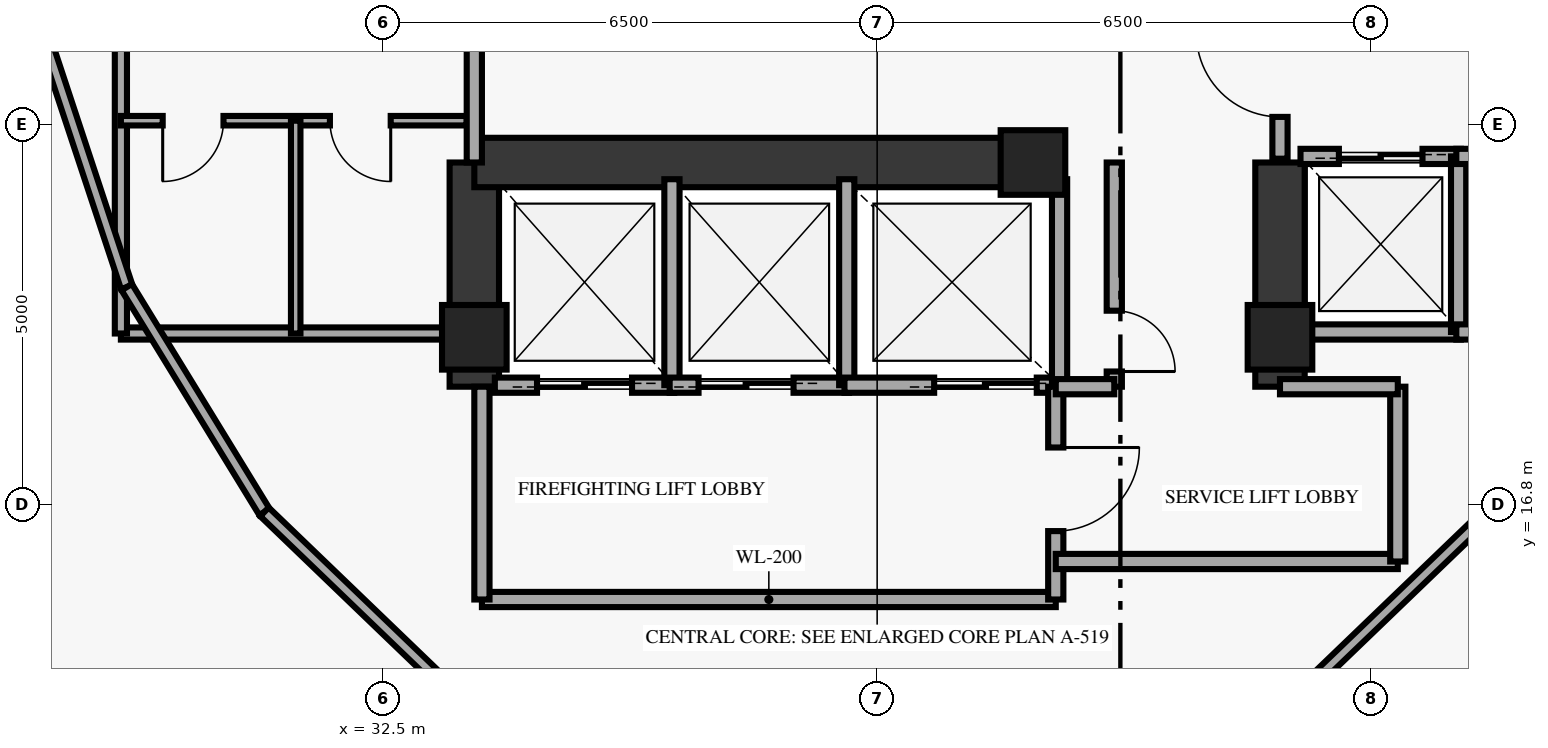
"""IFC4 building model, lengths in metres.
Left out: names, types, materials, properties, quantities, classifications, styles, units other than length and angle.
Written with IfcOpenShell. Run it as: python <this file> out.ifc"""

import sys

from ifc_helpers import new_model, si_unit, direction, frame, frame_2d, origin, origin_2d, place, context, subcontext, project, spatial, rectangle, extrude, element, fill, save


model = new_model("IFC4")
c1 = context("Model", 3, precision=1e-05, world=origin(), true_north=direction((0.0, 1.0)))
c2 = subcontext(c1, "Body", "Model", "MODEL_VIEW")
j1 = project(units=[si_unit("LENGTHUNIT", "METRE"), si_unit("PLANEANGLEUNIT", "RADIAN")], contexts=[c1])
p1 = place(None, origin())
s1 = spatial("IfcSite", under=j1, at=p1, CompositionType="ELEMENT")
p2 = place(p1, origin())
s2 = spatial("IfcBuilding", under=s1, at=p2, CompositionType="ELEMENT")
p3 = place(p2, frame((0.0, 0.0, 203.15)))
s3 = spatial("IfcBuildingStorey", under=s2, at=p3, CompositionType="ELEMENT", Elevation=203.15)
for number, where, z_axis, x_axis in (
    (1, (33.7, 19.0, 0.0), (0.0, 0.0, 1.0), (1.0, 0.0, 0.0)),
    (2, (41.05, 21.3, 0.0), (0.0, 0.0, 1.0), (1.0, 0.0, 0.0)),
    (3, (44.3, 19.0, 0.0), (0.0, 0.0, 1.0), (1.0, 0.0, 0.0)),
):
    element("IfcColumn", number, at=place(p3, frame(where, z_axis=z_axis, x_axis=x_axis)), inside=s3, PredefinedType="PILASTER", context=c2, shape_type="SweptSolid", body=[
        extrude(rectangle(XDim=0.85, YDim=0.85, at=origin_2d()), origin(), (0.0, 0.0, 1.0), 4.76),
    ])
for number, where, z_axis, x_axis in (
    (4, (33.7, 18.35, 0.0), (0.0, 0.0, 1.0), (0.0, 1.0, 0.0)),
    (5, (44.3, 18.35, 0.0), (0.0, 0.0, 1.0), (0.0, 1.0, 0.0)),
):
    element("IfcWall", number, at=place(p3, frame(where, z_axis=z_axis, x_axis=x_axis)), inside=s3, PredefinedType="SHEAR", context=c2, shape_type="SweptSolid", body=[
        extrude(rectangle(XDim=2.95, YDim=0.65, at=frame_2d((1.475, 0.0))), origin(), (0.0, 0.0, 1.0), 4.76),
    ])
p4 = place(p3, frame((33.7, 21.3, 0.0), z_axis=(0.0, 0.0, 1.0), x_axis=(1.0, 0.0, 0.0)))
e6 = element("IfcWall", 6, at=p4, inside=s3, PredefinedType="SHEAR", context=c2, shape_type="SweptSolid", body=[
    extrude(rectangle(XDim=7.55, YDim=0.65, at=frame_2d((3.775, 0.0))), origin(), (0.0, 0.0, 1.0), 4.76),
])
p5 = place(p3, frame((44.57, 19.07, 0.0), z_axis=(0.0, 0.0, 1.0), x_axis=(1.0, 0.0, 0.0)))
e7 = element("IfcWall", 7, at=p5, inside=s3, PredefinedType="SOLIDWALL", context=c2, shape_type="SweptSolid", body=[
    extrude(rectangle(XDim=2.11, YDim=0.2, at=frame_2d((1.055, 0.0))), origin(), (0.0, 0.0, 1.0), 4.76),
])
p6 = place(p3, frame((44.57, 21.38, 0.0), z_axis=(0.0, 0.0, 1.0), x_axis=(1.0, 0.0, 0.0)))
e8 = element("IfcWall", 8, at=p6, inside=s3, PredefinedType="SOLIDWALL", context=c2, shape_type="SweptSolid", body=[
    extrude(rectangle(XDim=2.11, YDim=0.2, at=frame_2d((1.055, 0.0))), origin(), (0.0, 0.0, 1.0), 4.76),
])
p7 = place(p6, frame((0.505, 0.0, 0.0)))
e9 = element("IfcOpeningElement", 9, at=p7, cuts=e8, PredefinedType="OPENING", context=c2, shape_type="SweptSolid", body=[
    extrude(rectangle(XDim=1.1, YDim=2.15, at=frame_2d((0.55, 1.075))), frame((0.0, 0.11, 0.0), z_axis=(0.0, -1.0, 0.0), x_axis=(1.0, 0.0, 0.0)), (0.0, 0.0, 1.0), 0.22),
])
for number, where, z_axis, x_axis in (
    (10, (46.65, 19.07, 0.0), (0.0, 0.0, 1.0), (0.0, 1.0, 0.0)),
    (11, (46.62, 19.07, 0.0), (0.0, 0.0, 1.0), (1.0, 0.0, 0.0)),
):
    element("IfcWall", number, at=place(p3, frame(where, z_axis=z_axis, x_axis=x_axis)), inside=s3, PredefinedType="SOLIDWALL", context=c2, shape_type="SweptSolid", body=[
        extrude(rectangle(XDim=2.31, YDim=0.2, at=frame_2d((1.155, 0.0))), origin(), (0.0, 0.0, 1.0), 4.76),
    ])
p8 = place(p3, frame((46.62, 21.38, 0.0), z_axis=(0.0, 0.0, 1.0), x_axis=(1.0, 0.0, 0.0)))
e12 = element("IfcWall", 12, at=p8, inside=s3, PredefinedType="SOLIDWALL", context=c2, shape_type="SweptSolid", body=[
    extrude(rectangle(XDim=2.31, YDim=0.2, at=frame_2d((1.155, 0.0))), origin(), (0.0, 0.0, 1.0), 4.76),
])
p9 = place(p8, frame((0.605, 0.0, 0.0)))
e13 = element("IfcOpeningElement", 13, at=p9, cuts=e12, PredefinedType="OPENING", context=c2, shape_type="SweptSolid", body=[
    extrude(rectangle(XDim=1.1, YDim=2.15, at=frame_2d((0.55, 1.075))), frame((0.0, 0.11, 0.0), z_axis=(0.0, -1.0, 0.0), x_axis=(1.0, 0.0, 0.0)), (0.0, 0.0, 1.0), 0.22),
])
p10 = place(p3, frame((33.97, 18.37, 0.0), z_axis=(0.0, 0.0, 1.0), x_axis=(1.0, 0.0, 0.0)))
e14 = element("IfcWall", 14, at=p10, inside=s3, PredefinedType="SOLIDWALL", context=c2, shape_type="SweptSolid", body=[
    extrude(rectangle(XDim=2.36, YDim=0.2, at=frame_2d((1.18, 0.0))), origin(), (0.0, 0.0, 1.0), 4.76),
])
p11 = place(p10, frame((0.555, 0.0, 0.0)))
e15 = element("IfcOpeningElement", 15, at=p11, cuts=e14, PredefinedType="OPENING", context=c2, shape_type="SweptSolid", body=[
    extrude(rectangle(XDim=1.25, YDim=2.2, at=frame_2d((0.625, 1.1))), frame((0.0, 0.11, 0.0), z_axis=(0.0, -1.0, 0.0), x_axis=(1.0, 0.0, 0.0)), (0.0, 0.0, 1.0), 0.22),
])
p12 = place(p3, frame((36.3, 18.37, 0.0), z_axis=(0.0, 0.0, 1.0), x_axis=(0.0, 1.0, 0.0)))
e16 = element("IfcWall", 16, at=p12, inside=s3, PredefinedType="SOLIDWALL", context=c2, shape_type="SweptSolid", body=[
    extrude(rectangle(XDim=2.71, YDim=0.2, at=frame_2d((1.355, 0.0))), origin(), (0.0, 0.0, 1.0), 4.76),
])
p13 = place(p3, frame((36.27, 18.37, 0.0), z_axis=(0.0, 0.0, 1.0), x_axis=(1.0, 0.0, 0.0)))
e17 = element("IfcWall", 17, at=p13, inside=s3, PredefinedType="SOLIDWALL", context=c2, shape_type="SweptSolid", body=[
    extrude(rectangle(XDim=2.36, YDim=0.2, at=frame_2d((1.18, 0.0))), origin(), (0.0, 0.0, 1.0), 4.76),
])
p14 = place(p13, frame((0.38, 0.0, 0.0)))
e18 = element("IfcOpeningElement", 18, at=p14, cuts=e17, PredefinedType="OPENING", context=c2, shape_type="SweptSolid", body=[
    extrude(rectangle(XDim=1.25, YDim=2.2, at=frame_2d((0.625, 1.1))), frame((0.0, 0.11, 0.0), z_axis=(0.0, -1.0, 0.0), x_axis=(1.0, 0.0, 0.0)), (0.0, 0.0, 1.0), 0.22),
])
p15 = place(p3, frame((38.6, 18.37, 0.0), z_axis=(0.0, 0.0, 1.0), x_axis=(0.0, 1.0, 0.0)))
e19 = element("IfcWall", 19, at=p15, inside=s3, PredefinedType="SOLIDWALL", context=c2, shape_type="SweptSolid", body=[
    extrude(rectangle(XDim=2.71, YDim=0.2, at=frame_2d((1.355, 0.0))), origin(), (0.0, 0.0, 1.0), 4.76),
])
p16 = place(p3, frame((38.57, 18.37, 0.0), z_axis=(0.0, 0.0, 1.0), x_axis=(1.0, 0.0, 0.0)))
e20 = element("IfcWall", 20, at=p16, inside=s3, PredefinedType="SOLIDWALL", context=c2, shape_type="SweptSolid", body=[
    extrude(rectangle(XDim=2.83, YDim=0.2, at=frame_2d((1.415, 0.0))), origin(), (0.0, 0.0, 1.0), 4.76),
])
p17 = place(p16, frame((1.18, 0.0, 0.0)))
e21 = element("IfcOpeningElement", 21, at=p17, cuts=e20, PredefinedType="OPENING", context=c2, shape_type="SweptSolid", body=[
    extrude(rectangle(XDim=1.35, YDim=2.18, at=frame_2d((0.675, 1.09))), frame((0.0, 0.11, 0.0), z_axis=(0.0, -1.0, 0.0), x_axis=(1.0, 0.0, 0.0)), (0.0, 0.0, 1.0), 0.22),
])
p18 = place(p3, frame((41.4, 18.37, 0.0), z_axis=(0.0, 0.0, 1.0), x_axis=(0.0, 1.0, 0.0)))
e22 = element("IfcWall", 22, at=p18, inside=s3, PredefinedType="SOLIDWALL", context=c2, shape_type="SweptSolid", body=[
    extrude(rectangle(XDim=2.71, YDim=0.2, at=frame_2d((1.355, 0.0))), origin(), (0.0, 0.0, 1.0), 4.76),
])
p19 = place(p3, frame((29.05, 19.05, 0.0), z_axis=(0.0, 0.0, 1.0), x_axis=(1.0, 0.0, 0.0)))
e23 = element("IfcWall", 23, at=p19, inside=s3, PredefinedType="PARTITIONING", context=c2, shape_type="SweptSolid", body=[
    extrude(rectangle(XDim=4.65, YDim=0.16, at=frame_2d((2.325, 0.0))), origin(), (0.0, 0.0, 1.0), 4.76),
])
p20 = place(p3, frame((29.05, 19.05, 0.0), z_axis=(0.0, 0.0, 1.0), x_axis=(0.0, 1.0, 0.0)))
e24 = element("IfcWall", 24, at=p20, inside=s3, PredefinedType="PARTITIONING", context=c2, shape_type="SweptSolid", body=[
    extrude(rectangle(XDim=7.07, YDim=0.16, at=frame_2d((3.535, 0.0))), origin(), (0.0, 0.0, 1.0), 4.76),
])
p21 = place(p3, frame((33.6, 21.85, 0.0), z_axis=(0.0, 0.0, 1.0), x_axis=(-1.0, 0.0, 0.0)))
e25 = element("IfcWall", 25, at=p21, inside=s3, PredefinedType="PARTITIONING", context=c2, shape_type="SweptSolid", body=[
    extrude(rectangle(XDim=4.55, YDim=0.125, at=frame_2d((2.275, 0.0))), origin(), (0.0, 0.0, 1.0), 4.76),
])
p22 = place(p21, frame((3.2, 0.0, 0.0)))
e26 = element("IfcOpeningElement", 26, at=p22, cuts=e25, PredefinedType="OPENING", context=c2, shape_type="SweptSolid", body=[
    extrude(rectangle(XDim=0.8, YDim=2.05, at=frame_2d((0.4, 1.025))), frame((0.0, 0.073, 0.0), z_axis=(0.0, -1.0, 0.0), x_axis=(1.0, 0.0, 0.0)), (0.0, 0.0, 1.0), 0.145),
])
p23 = place(p21, frame((1.0, 0.0, 0.0)))
e27 = element("IfcOpeningElement", 27, at=p23, cuts=e25, PredefinedType="OPENING", context=c2, shape_type="SweptSolid", body=[
    extrude(rectangle(XDim=0.8, YDim=2.05, at=frame_2d((0.4, 1.025))), frame((0.0, 0.073, 0.0), z_axis=(0.0, -1.0, 0.0), x_axis=(1.0, 0.0, 0.0)), (0.0, 0.0, 1.0), 0.145),
])
p24 = place(p3, frame((31.35, 19.05, 0.0), z_axis=(0.0, 0.0, 1.0), x_axis=(0.0, 1.0, 0.0)))
e28 = element("IfcWall", 28, at=p24, inside=s3, PredefinedType="PARTITIONING", context=c2, shape_type="SweptSolid", body=[
    extrude(rectangle(XDim=2.8, YDim=0.125, at=frame_2d((1.4, 0.0))), origin(), (0.0, 0.0, 1.0), 4.76),
])
p25 = place(p3, frame((33.7, 21.3, 0.0), z_axis=(0.0, 0.0, 1.0), x_axis=(0.0, 1.0, 0.0)))
e29 = element("IfcWall", 29, at=p25, inside=s3, PredefinedType="SOLIDWALL", context=c2, shape_type="SweptSolid", body=[
    extrude(rectangle(XDim=2.15, YDim=0.2, at=frame_2d((1.075, 0.0))), origin(), (0.0, 0.0, 1.0), 4.145),
])
p26 = place(p3, frame((44.3, 21.35, 0.0), z_axis=(0.0, 0.0, 1.0), x_axis=(0.0, 1.0, 0.0)))
e30 = element("IfcWall", 30, at=p26, inside=s3, PredefinedType="SOLIDWALL", context=c2, shape_type="SweptSolid", body=[
    extrude(rectangle(XDim=2.1, YDim=0.2, at=frame_2d((1.05, 0.0))), origin(), (0.0, 0.0, 1.0), 4.145),
])
p27 = place(p26, frame((0.55, 0.0, 0.0)))
e31 = element("IfcOpeningElement", 31, at=p27, cuts=e30, PredefinedType="OPENING", context=c2, shape_type="SweptSolid", body=[
    extrude(rectangle(XDim=1.1, YDim=2.15, at=frame_2d((0.55, 1.075))), frame((0.0, 0.11, 0.0), z_axis=(0.0, -1.0, 0.0), x_axis=(1.0, 0.0, 0.0)), (0.0, 0.0, 1.0), 0.22),
])
p28 = place(p3, frame((33.8, 15.55, 0.0), z_axis=(0.0, 0.0, 1.0), x_axis=(1.0, 0.0, 0.0)))
e32 = element("IfcWall", 32, at=p28, inside=s3, PredefinedType="SOLIDWALL", context=c2, shape_type="SweptSolid", body=[
    extrude(rectangle(XDim=7.55, YDim=0.2, at=frame_2d((3.775, 0.0))), origin(), (0.0, 0.0, 1.0), 4.76),
])
p29 = place(p3, frame((33.8, 15.55, 0.0), z_axis=(0.0, 0.0, 1.0), x_axis=(0.0, 1.0, 0.0)))
e33 = element("IfcWall", 33, at=p29, inside=s3, PredefinedType="SOLIDWALL", context=c2, shape_type="SweptSolid", body=[
    extrude(rectangle(XDim=2.8, YDim=0.2, at=frame_2d((1.4, 0.0))), origin(), (0.0, 0.0, 1.0), 4.76),
])
p30 = place(p3, frame((41.35, 15.55, 0.0), z_axis=(0.0, 0.0, 1.0), x_axis=(0.0, 1.0, 0.0)))
e34 = element("IfcWall", 34, at=p30, inside=s3, PredefinedType="SOLIDWALL", context=c2, shape_type="SweptSolid", body=[
    extrude(rectangle(XDim=2.8, YDim=0.2, at=frame_2d((1.4, 0.0))), origin(), (0.0, 0.0, 1.0), 4.76),
])
p31 = place(p30, frame((0.9, 0.0, 0.0)))
e35 = element("IfcOpeningElement", 35, at=p31, cuts=e34, PredefinedType="OPENING", context=c2, shape_type="SweptSolid", body=[
    extrude(rectangle(XDim=1.1, YDim=2.15, at=frame_2d((0.55, 1.075))), frame((0.0, 0.11, 0.0), z_axis=(0.0, -1.0, 0.0), x_axis=(1.0, 0.0, 0.0)), (0.0, 0.0, 1.0), 0.22),
])
p32 = place(p3, frame((41.35, 16.05, 0.0), z_axis=(0.0, 0.0, 1.0), x_axis=(1.0, 0.0, 0.0)))
e36 = element("IfcWall", 36, at=p32, inside=s3, PredefinedType="SOLIDWALL", context=c2, shape_type="SweptSolid", body=[
    extrude(rectangle(XDim=4.5, YDim=0.2, at=frame_2d((2.25, 0.0))), origin(), (0.0, 0.0, 1.0), 4.76),
])
p33 = place(p3, frame((45.85, 16.05, 0.0), z_axis=(0.0, 0.0, 1.0), x_axis=(0.0, 1.0, 0.0)))
e37 = element("IfcWall", 37, at=p33, inside=s3, PredefinedType="SOLIDWALL", context=c2, shape_type="SweptSolid", body=[
    extrude(rectangle(XDim=2.3, YDim=0.2, at=frame_2d((1.15, 0.0))), origin(), (0.0, 0.0, 1.0), 4.76),
])
p34 = place(p3, frame((44.3, 18.35, 0.0), z_axis=(0.0, 0.0, 1.0), x_axis=(1.0, 0.0, 0.0)))
e38 = element("IfcWall", 38, at=p34, inside=s3, PredefinedType="SOLIDWALL", context=c2, shape_type="SweptSolid", body=[
    extrude(rectangle(XDim=1.55, YDim=0.2, at=frame_2d((0.775, 0.0))), origin(), (0.0, 0.0, 1.0), 4.76),
])
p35 = place(p3, frame((42.12, 18.35, 0.0), z_axis=(0.0, 0.0, 1.0), x_axis=(0.0, 1.0, 0.0)))
e39 = element("IfcWall", 39, at=p35, inside=s3, PredefinedType="SOLIDWALL", context=c2, shape_type="SweptSolid", body=[
    extrude(rectangle(XDim=2.95, YDim=0.2, at=frame_2d((1.475, 0.0))), origin(), (0.0, 0.0, 1.0), 4.76),
])
p36 = place(p35, frame((0.2, 0.0, 0.0)))
e40 = element("IfcOpeningElement", 40, at=p36, cuts=e39, PredefinedType="OPENING", context=c2, shape_type="SweptSolid", body=[
    extrude(rectangle(XDim=0.8, YDim=2.05, at=frame_2d((0.4, 1.025))), frame((0.0, 0.11, 0.0), z_axis=(0.0, -1.0, 0.0), x_axis=(1.0, 0.0, 0.0)), (0.0, 0.0, 1.0), 0.22),
])
p37 = place(p3, frame((41.35, 18.35, 0.0), z_axis=(0.0, 0.0, 1.0), x_axis=(1.0, 0.0, 0.0)))
e41 = element("IfcWall", 41, at=p37, inside=s3, PredefinedType="SOLIDWALL", context=c2, shape_type="SweptSolid", body=[
    extrude(rectangle(XDim=0.77, YDim=0.2, at=frame_2d((0.385, 0.0))), origin(), (0.0, 0.0, 1.0), 4.76),
])
p38 = place(p3, frame((27.988, 23.104, 0.0), z_axis=(0.0, 0.0, 1.0), x_axis=(0.313965508334, -0.949434389295, 0.0)))
e42 = element("IfcWall", 42, at=p38, inside=s3, PredefinedType="PARTITIONING", context=c2, shape_type="SweptSolid", body=[
    extrude(rectangle(XDim=3.627, YDim=0.16, at=frame_2d((1.814, 0.0))), origin(), (0.0, 0.0, 1.0), 4.76),
])
p39 = place(p3, frame((29.127, 19.66, 0.0), z_axis=(0.0, 0.0, 1.0), x_axis=(0.522486120877, -0.852647789823, 0.0)))
e43 = element("IfcWall", 43, at=p39, inside=s3, PredefinedType="PARTITIONING", context=c2, shape_type="SweptSolid", body=[
    extrude(rectangle(XDim=3.468, YDim=0.16, at=frame_2d((1.734, 0.0))), origin(), (0.0, 0.0, 1.0), 4.76),
])
for number, where, z_axis, x_axis in (
    (44, (30.939, 16.703, 0.0), (0.0, 0.0, 1.0), (0.721, -0.693, 0.0)),
    (45, (44.7, 14.433, 0.0), (0.0, 0.0, 1.0), (0.721, 0.693, 0.0)),
):
    element("IfcWall", number, at=place(p3, frame(where, z_axis=z_axis, x_axis=x_axis)), inside=s3, PredefinedType="PARTITIONING", context=c2, shape_type="SweptSolid", body=[
        extrude(rectangle(XDim=3.275, YDim=0.16, at=frame_2d((1.638, 0.0))), origin(), (0.0, 0.0, 1.0), 4.76),
    ])
p40 = place(p7, origin())
e46 = element("IfcDoor", 46, at=p40, inside=s3, OperationType="DOUBLE_DOOR_SLIDING", PredefinedType="DOOR", context=c2, shape_type="SweptSolid", body=[
    extrude(rectangle(XDim=1.1, YDim=2.15, at=frame_2d((0.55, 1.075))), frame((0.0, 0.025, 0.0), z_axis=(0.0, -1.0, 0.0), x_axis=(1.0, 0.0, 0.0)), (0.0, 0.0, 1.0), 0.05),
])
fill(e9, e46)
p41 = place(p11, origin())
e47 = element("IfcDoor", 47, at=p41, inside=s3, OperationType="DOUBLE_DOOR_SLIDING", PredefinedType="DOOR", context=c2, shape_type="SweptSolid", body=[
    extrude(rectangle(XDim=1.25, YDim=2.2, at=frame_2d((0.625, 1.1))), frame((0.0, 0.025, 0.0), z_axis=(0.0, -1.0, 0.0), x_axis=(1.0, 0.0, 0.0)), (0.0, 0.0, 1.0), 0.05),
])
fill(e15, e47)
p42 = place(p14, origin())
e48 = element("IfcDoor", 48, at=p42, inside=s3, OperationType="DOUBLE_DOOR_SLIDING", PredefinedType="DOOR", context=c2, shape_type="SweptSolid", body=[
    extrude(rectangle(XDim=1.25, YDim=2.2, at=frame_2d((0.625, 1.1))), frame((0.0, 0.025, 0.0), z_axis=(0.0, -1.0, 0.0), x_axis=(1.0, 0.0, 0.0)), (0.0, 0.0, 1.0), 0.05),
])
fill(e18, e48)
p43 = place(p17, origin())
e49 = element("IfcDoor", 49, at=p43, inside=s3, OperationType="DOUBLE_DOOR_SLIDING", PredefinedType="DOOR", context=c2, shape_type="SweptSolid", body=[
    extrude(rectangle(XDim=1.35, YDim=2.18, at=frame_2d((0.675, 1.09))), frame((0.0, 0.025, 0.0), z_axis=(0.0, -1.0, 0.0), x_axis=(1.0, 0.0, 0.0)), (0.0, 0.0, 1.0), 0.05),
])
fill(e21, e49)
p44 = place(p22, origin())
e50 = element("IfcDoor", 50, at=p44, inside=s3, OperationType="SINGLE_SWING_RIGHT", PredefinedType="DOOR", context=c2, shape_type="SweptSolid", body=[
    extrude(rectangle(XDim=0.8, YDim=2.05, at=frame_2d((0.4, 1.025))), frame((0.0, 0.025, 0.0), z_axis=(0.0, -1.0, 0.0), x_axis=(1.0, 0.0, 0.0)), (0.0, 0.0, 1.0), 0.05),
])
fill(e26, e50)
p45 = place(p23, origin())
e51 = element("IfcDoor", 51, at=p45, inside=s3, OperationType="SINGLE_SWING_LEFT", PredefinedType="DOOR", context=c2, shape_type="SweptSolid", body=[
    extrude(rectangle(XDim=0.8, YDim=2.05, at=frame_2d((0.4, 1.025))), frame((0.0, 0.025, 0.0), z_axis=(0.0, -1.0, 0.0), x_axis=(1.0, 0.0, 0.0)), (0.0, 0.0, 1.0), 0.05),
])
fill(e27, e51)
p46 = place(p27, origin())
e52 = element("IfcDoor", 52, at=p46, inside=s3, OperationType="SINGLE_SWING_RIGHT", PredefinedType="DOOR", context=c2, shape_type="SweptSolid", body=[
    extrude(rectangle(XDim=1.1, YDim=2.15, at=frame_2d((0.55, 1.075))), frame((0.0, 0.025, 0.0), z_axis=(0.0, -1.0, 0.0), x_axis=(1.0, 0.0, 0.0)), (0.0, 0.0, 1.0), 0.05),
])
fill(e31, e52)
p47 = place(p31, origin())
e53 = element("IfcDoor", 53, at=p47, inside=s3, OperationType="SINGLE_SWING_RIGHT", PredefinedType="DOOR", context=c2, shape_type="SweptSolid", body=[
    extrude(rectangle(XDim=1.1, YDim=2.15, at=frame_2d((0.55, 1.075))), frame((0.0, 0.025, 0.0), z_axis=(0.0, -1.0, 0.0), x_axis=(1.0, 0.0, 0.0)), (0.0, 0.0, 1.0), 0.05),
])
fill(e35, e53)
p48 = place(p36, origin())
e54 = element("IfcDoor", 54, at=p48, inside=s3, OperationType="SINGLE_SWING_LEFT", PredefinedType="DOOR", context=c2, shape_type="SweptSolid", body=[
    extrude(rectangle(XDim=0.8, YDim=2.05, at=frame_2d((0.4, 1.025))), frame((0.0, 0.025, 0.0), z_axis=(0.0, -1.0, 0.0), x_axis=(1.0, 0.0, 0.0)), (0.0, 0.0, 1.0), 0.05),
])
fill(e40, e54)
save(model, sys.argv[1])
